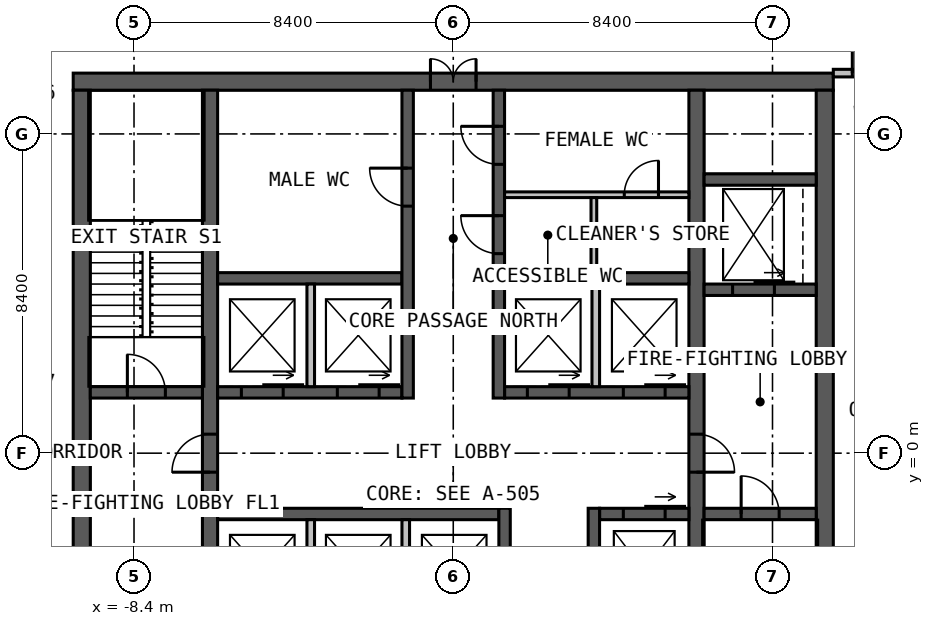
"""IFC4 building model, lengths in metres.
Left out: names, types, materials, properties, quantities, classifications, styles, units other than length and angle.
Written with IfcOpenShell. Run it as: python <this file> out.ifc"""

import sys

from ifc_helpers import new_model, si_unit, direction, frame, frame_2d, origin, place, context, subcontext, project, spatial, rectangle, extrude, element, fill, save


model = new_model("IFC4")
c1 = context("Model", 3, precision=1e-05, world=origin(), true_north=direction((0.0, 1.0)))
c2 = subcontext(c1, "Body", "Model", "MODEL_VIEW")
j1 = project(units=[si_unit("LENGTHUNIT", "METRE"), si_unit("PLANEANGLEUNIT", "RADIAN")], contexts=[c1])
p1 = place(None, origin())
s1 = spatial("IfcSite", under=j1, at=p1, CompositionType="ELEMENT")
p2 = place(p1, origin())
s2 = spatial("IfcBuilding", under=s1, at=p2, CompositionType="ELEMENT")
p3 = place(p2, frame((0.0, 0.0, 195.0)))
s3 = spatial("IfcBuildingStorey", under=s2, at=p3, CompositionType="ELEMENT", Elevation=195.0)
p4 = place(p3, frame((-10.0, 9.775, 0.0), z_axis=(0.0, 0.0, 1.0), x_axis=(1.0, 0.0, 0.0)))
e1 = element("IfcWall", 1, at=p4, inside=s3, PredefinedType="SOLIDWALL", context=c2, shape_type="SweptSolid", body=[
    extrude(rectangle(XDim=20.0, YDim=0.45, at=frame_2d((10.0, 0.0))), origin(), (0.0, 0.0, 1.0), 4.0),
])
p5 = place(p4, frame((9.4, 0.0, 0.0)))
e2 = element("IfcOpeningElement", 2, at=p5, cuts=e1, PredefinedType="OPENING", context=c2, shape_type="SweptSolid", body=[
    extrude(rectangle(XDim=1.2, YDim=2.2, at=frame_2d((0.6, 1.1))), frame((0.0, 0.235, 0.0), z_axis=(0.0, -1.0, 0.0), x_axis=(1.0, 0.0, 0.0)), (0.0, 0.0, 1.0), 0.47),
])
for number, where, z_axis, x_axis in (
    (3, (9.775, -9.55, 0.0), (0.0, 0.0, 1.0), (0.0, 1.0, 0.0)),
    (4, (-9.775, 9.55, 0.0), (0.0, 0.0, 1.0), (0.0, -1.0, 0.0)),
):
    element("IfcWall", number, at=place(p3, frame(where, z_axis=z_axis, x_axis=x_axis)), inside=s3, PredefinedType="SOLIDWALL", context=c2, shape_type="SweptSolid", body=[
        extrude(rectangle(XDim=19.1, YDim=0.45, at=frame_2d((9.55, 0.0))), origin(), (0.0, 0.0, 1.0), 4.0),
    ])
p6 = place(p3, frame((-6.4, -9.55, 0.0), z_axis=(0.0, 0.0, 1.0), x_axis=(0.0, 1.0, 0.0)))
e5 = element("IfcWall", 5, at=p6, inside=s3, PredefinedType="SOLIDWALL", context=c2, shape_type="SweptSolid", body=[
    extrude(rectangle(XDim=19.1, YDim=0.4, at=frame_2d((9.55, 0.0))), origin(), (0.0, 0.0, 1.0), 4.0),
])
p7 = place(p6, frame((9.05, 0.0, 0.0)))
e6 = element("IfcOpeningElement", 6, at=p7, cuts=e5, PredefinedType="OPENING", context=c2, shape_type="SweptSolid", body=[
    extrude(rectangle(XDim=1.0, YDim=2.2, at=frame_2d((0.5, 1.1))), frame((0.0, 0.21, 0.0), z_axis=(0.0, -1.0, 0.0), x_axis=(1.0, 0.0, 0.0)), (0.0, 0.0, 1.0), 0.42),
])
p8 = place(p3, frame((6.4, 9.55, 0.0), z_axis=(0.0, 0.0, 1.0), x_axis=(0.0, -1.0, 0.0)))
e7 = element("IfcWall", 7, at=p8, inside=s3, PredefinedType="SOLIDWALL", context=c2, shape_type="SweptSolid", body=[
    extrude(rectangle(XDim=19.1, YDim=0.4, at=frame_2d((9.55, 0.0))), origin(), (0.0, 0.0, 1.0), 4.0),
])
p9 = place(p8, frame((9.05, 0.0, 0.0)))
e8 = element("IfcOpeningElement", 8, at=p9, cuts=e7, PredefinedType="OPENING", context=c2, shape_type="SweptSolid", body=[
    extrude(rectangle(XDim=1.0, YDim=2.2, at=frame_2d((0.5, 1.1))), frame((0.0, 0.21, 0.0), z_axis=(0.0, -1.0, 0.0), x_axis=(1.0, 0.0, 0.0)), (0.0, 0.0, 1.0), 0.42),
])
p10 = place(p3, frame((-6.2, 1.6, 0.0), z_axis=(0.0, 0.0, 1.0), x_axis=(1.0, 0.0, 0.0)))
e9 = element("IfcWall", 9, at=p10, inside=s3, PredefinedType="SOLIDWALL", context=c2, shape_type="SweptSolid", body=[
    extrude(rectangle(XDim=4.85, YDim=0.3, at=frame_2d((2.425, 0.0))), origin(), (0.0, 0.0, 1.0), 4.0),
])
p11 = place(p10, frame((0.625, 0.0, 0.0)))
e10 = element("IfcOpeningElement", 10, at=p11, cuts=e9, PredefinedType="OPENING", context=c2, shape_type="SweptSolid", body=[
    extrude(rectangle(XDim=1.1, YDim=2.2, at=frame_2d((0.55, 1.1))), frame((0.0, 0.16, 0.0), z_axis=(0.0, -1.0, 0.0), x_axis=(1.0, 0.0, 0.0)), (0.0, 0.0, 1.0), 0.32),
])
p12 = place(p10, frame((3.15, 0.0, 0.0)))
e11 = element("IfcOpeningElement", 11, at=p12, cuts=e9, PredefinedType="OPENING", context=c2, shape_type="SweptSolid", body=[
    extrude(rectangle(XDim=1.1, YDim=2.2, at=frame_2d((0.55, 1.1))), frame((0.0, 0.16, 0.0), z_axis=(0.0, -1.0, 0.0), x_axis=(1.0, 0.0, 0.0)), (0.0, 0.0, 1.0), 0.32),
])
p13 = place(p3, frame((1.35, 1.6, 0.0), z_axis=(0.0, 0.0, 1.0), x_axis=(1.0, 0.0, 0.0)))
e12 = element("IfcWall", 12, at=p13, inside=s3, PredefinedType="SOLIDWALL", context=c2, shape_type="SweptSolid", body=[
    extrude(rectangle(XDim=4.85, YDim=0.3, at=frame_2d((2.425, 0.0))), origin(), (0.0, 0.0, 1.0), 4.0),
])
p14 = place(p13, frame((0.6, 0.0, 0.0)))
e13 = element("IfcOpeningElement", 13, at=p14, cuts=e12, PredefinedType="OPENING", context=c2, shape_type="SweptSolid", body=[
    extrude(rectangle(XDim=1.1, YDim=2.2, at=frame_2d((0.55, 1.1))), frame((0.0, 0.16, 0.0), z_axis=(0.0, -1.0, 0.0), x_axis=(1.0, 0.0, 0.0)), (0.0, 0.0, 1.0), 0.32),
])
p15 = place(p13, frame((3.125, 0.0, 0.0)))
e14 = element("IfcOpeningElement", 14, at=p15, cuts=e12, PredefinedType="OPENING", context=c2, shape_type="SweptSolid", body=[
    extrude(rectangle(XDim=1.1, YDim=2.2, at=frame_2d((0.55, 1.1))), frame((0.0, 0.16, 0.0), z_axis=(0.0, -1.0, 0.0), x_axis=(1.0, 0.0, 0.0)), (0.0, 0.0, 1.0), 0.32),
])
for number, where, z_axis, x_axis in (
    (15, (-6.2, 4.6, 0.0), (0.0, 0.0, 1.0), (1.0, 0.0, 0.0)),
    (16, (1.35, 4.6, 0.0), (0.0, 0.0, 1.0), (1.0, 0.0, 0.0)),
):
    element("IfcWall", number, at=place(p3, frame(where, z_axis=z_axis, x_axis=x_axis)), inside=s3, PredefinedType="SOLIDWALL", context=c2, shape_type="SweptSolid", body=[
        extrude(rectangle(XDim=4.85, YDim=0.3, at=frame_2d((2.425, 0.0))), origin(), (0.0, 0.0, 1.0), 4.0),
    ])
p16 = place(p3, frame((-1.2, 1.45, 0.0), z_axis=(0.0, 0.0, 1.0), x_axis=(0.0, 1.0, 0.0)))
e17 = element("IfcWall", 17, at=p16, inside=s3, PredefinedType="SOLIDWALL", context=c2, shape_type="SweptSolid", body=[
    extrude(rectangle(XDim=8.1, YDim=0.3, at=frame_2d((4.05, 0.0))), origin(), (0.0, 0.0, 1.0), 4.0),
])
p17 = place(p16, frame((5.05, 0.0, 0.0)))
e18 = element("IfcOpeningElement", 18, at=p17, cuts=e17, PredefinedType="OPENING", context=c2, shape_type="SweptSolid", body=[
    extrude(rectangle(XDim=1.0, YDim=2.2, at=frame_2d((0.5, 1.1))), frame((0.0, 0.16, 0.0), z_axis=(0.0, -1.0, 0.0), x_axis=(1.0, 0.0, 0.0)), (0.0, 0.0, 1.0), 0.32),
])
p18 = place(p3, frame((1.2, 1.45, 0.0), z_axis=(0.0, 0.0, 1.0), x_axis=(0.0, 1.0, 0.0)))
e19 = element("IfcWall", 19, at=p18, inside=s3, PredefinedType="SOLIDWALL", context=c2, shape_type="SweptSolid", body=[
    extrude(rectangle(XDim=8.1, YDim=0.3, at=frame_2d((4.05, 0.0))), origin(), (0.0, 0.0, 1.0), 4.0),
])
p19 = place(p18, frame((3.8, 0.0, 0.0)))
e20 = element("IfcOpeningElement", 20, at=p19, cuts=e19, PredefinedType="OPENING", context=c2, shape_type="SweptSolid", body=[
    extrude(rectangle(XDim=1.0, YDim=2.2, at=frame_2d((0.5, 1.1))), frame((0.0, 0.16, 0.0), z_axis=(0.0, -1.0, 0.0), x_axis=(1.0, 0.0, 0.0)), (0.0, 0.0, 1.0), 0.32),
])
p20 = place(p18, frame((6.15, 0.0, 0.0)))
e21 = element("IfcOpeningElement", 21, at=p20, cuts=e19, PredefinedType="OPENING", context=c2, shape_type="SweptSolid", body=[
    extrude(rectangle(XDim=1.0, YDim=2.2, at=frame_2d((0.5, 1.1))), frame((0.0, 0.16, 0.0), z_axis=(0.0, -1.0, 0.0), x_axis=(1.0, 0.0, 0.0)), (0.0, 0.0, 1.0), 0.32),
])
p21 = place(p3, frame((-6.2, -1.6, 0.0), z_axis=(0.0, 0.0, 1.0), x_axis=(1.0, 0.0, 0.0)))
e22 = element("IfcWall", 22, at=p21, inside=s3, PredefinedType="SOLIDWALL", context=c2, shape_type="SweptSolid", body=[
    extrude(rectangle(XDim=7.4, YDim=0.3, at=frame_2d((3.7, 0.0))), origin(), (0.0, 0.0, 1.0), 4.0),
])
p22 = place(p3, frame((3.85, -1.6, 0.0), z_axis=(0.0, 0.0, 1.0), x_axis=(1.0, 0.0, 0.0)))
e23 = element("IfcWall", 23, at=p22, inside=s3, PredefinedType="SOLIDWALL", context=c2, shape_type="SweptSolid", body=[
    extrude(rectangle(XDim=2.35, YDim=0.3, at=frame_2d((1.175, 0.0))), origin(), (0.0, 0.0, 1.0), 4.0),
])
p23 = place(p22, frame((0.625, 0.0, 0.0)))
e24 = element("IfcOpeningElement", 24, at=p23, cuts=e23, PredefinedType="OPENING", context=c2, shape_type="SweptSolid", body=[
    extrude(rectangle(XDim=1.1, YDim=2.2, at=frame_2d((0.55, 1.1))), frame((0.0, 0.16, 0.0), z_axis=(0.0, -1.0, 0.0), x_axis=(1.0, 0.0, 0.0)), (0.0, 0.0, 1.0), 0.32),
])
p24 = place(p3, frame((1.35, -1.45, 0.0), z_axis=(0.0, 0.0, 1.0), x_axis=(0.0, -1.0, 0.0)))
e25 = element("IfcWall", 25, at=p24, inside=s3, PredefinedType="SOLIDWALL", context=c2, shape_type="SweptSolid", body=[
    extrude(rectangle(XDim=8.1, YDim=0.3, at=frame_2d((4.05, 0.0))), origin(), (0.0, 0.0, 1.0), 4.0),
])
p25 = place(p24, frame((5.975, 0.0, 0.0)))
e26 = element("IfcOpeningElement", 26, at=p25, cuts=e25, PredefinedType="OPENING", context=c2, shape_type="SweptSolid", body=[
    extrude(rectangle(XDim=1.0, YDim=2.2, at=frame_2d((0.5, 1.1))), frame((0.0, 0.16, 0.0), z_axis=(0.0, -1.0, 0.0), x_axis=(1.0, 0.0, 0.0)), (0.0, 0.0, 1.0), 0.32),
])
p26 = place(p24, frame((3.525, 0.0, 0.0)))
e27 = element("IfcOpeningElement", 27, at=p26, cuts=e25, PredefinedType="OPENING", context=c2, shape_type="SweptSolid", body=[
    extrude(rectangle(XDim=0.9, YDim=2.2, at=frame_2d((0.45, 1.1))), frame((0.0, 0.16, 0.0), z_axis=(0.0, -1.0, 0.0), x_axis=(1.0, 0.0, 0.0)), (0.0, 0.0, 1.0), 0.32),
])
p27 = place(p3, frame((3.7, -1.45, 0.0), z_axis=(0.0, 0.0, 1.0), x_axis=(0.0, -1.0, 0.0)))
e28 = element("IfcWall", 28, at=p27, inside=s3, PredefinedType="SOLIDWALL", context=c2, shape_type="SweptSolid", body=[
    extrude(rectangle(XDim=8.1, YDim=0.3, at=frame_2d((4.05, 0.0))), origin(), (0.0, 0.0, 1.0), 4.0),
])
p28 = place(p27, frame((5.1, 0.0, 0.0)))
e29 = element("IfcOpeningElement", 29, at=p28, cuts=e28, PredefinedType="OPENING", context=c2, shape_type="SweptSolid", body=[
    extrude(rectangle(XDim=0.9, YDim=2.2, at=frame_2d((0.45, 1.1))), frame((0.0, 0.16, 0.0), z_axis=(0.0, -1.0, 0.0), x_axis=(1.0, 0.0, 0.0)), (0.0, 0.0, 1.0), 0.32),
])
p29 = place(p3, frame((-9.55, 1.6, 0.0), z_axis=(0.0, 0.0, 1.0), x_axis=(1.0, 0.0, 0.0)))
e30 = element("IfcWall", 30, at=p29, inside=s3, PredefinedType="SOLIDWALL", context=c2, shape_type="SweptSolid", body=[
    extrude(rectangle(XDim=2.95, YDim=0.3, at=frame_2d((1.475, 0.0))), origin(), (0.0, 0.0, 1.0), 4.0),
])
p30 = place(p29, frame((0.975, 0.0, 0.0)))
e31 = element("IfcOpeningElement", 31, at=p30, cuts=e30, PredefinedType="OPENING", context=c2, shape_type="SweptSolid", body=[
    extrude(rectangle(XDim=1.0, YDim=2.2, at=frame_2d((0.5, 1.1))), frame((0.0, 0.16, 0.0), z_axis=(0.0, -1.0, 0.0), x_axis=(1.0, 0.0, 0.0)), (0.0, 0.0, 1.0), 0.32),
])
p31 = place(p3, frame((6.6, -1.6, 0.0), z_axis=(0.0, 0.0, 1.0), x_axis=(1.0, 0.0, 0.0)))
e32 = element("IfcWall", 32, at=p31, inside=s3, PredefinedType="SOLIDWALL", context=c2, shape_type="SweptSolid", body=[
    extrude(rectangle(XDim=2.95, YDim=0.3, at=frame_2d((1.475, 0.0))), origin(), (0.0, 0.0, 1.0), 4.0),
])
p32 = place(p31, frame((0.975, 0.0, 0.0)))
e33 = element("IfcOpeningElement", 33, at=p32, cuts=e32, PredefinedType="OPENING", context=c2, shape_type="SweptSolid", body=[
    extrude(rectangle(XDim=1.0, YDim=2.2, at=frame_2d((0.5, 1.1))), frame((0.0, 0.16, 0.0), z_axis=(0.0, -1.0, 0.0), x_axis=(1.0, 0.0, 0.0)), (0.0, 0.0, 1.0), 0.32),
])
p33 = place(p3, frame((6.6, 4.3, 0.0), z_axis=(0.0, 0.0, 1.0), x_axis=(1.0, 0.0, 0.0)))
e34 = element("IfcWall", 34, at=p33, inside=s3, PredefinedType="SOLIDWALL", context=c2, shape_type="SweptSolid", body=[
    extrude(rectangle(XDim=2.95, YDim=0.3, at=frame_2d((1.475, 0.0))), origin(), (0.0, 0.0, 1.0), 4.0),
])
p34 = place(p33, frame((0.75, 0.0, 0.0)))
e35 = element("IfcOpeningElement", 35, at=p34, cuts=e34, PredefinedType="OPENING", context=c2, shape_type="SweptSolid", body=[
    extrude(rectangle(XDim=1.1, YDim=2.2, at=frame_2d((0.55, 1.1))), frame((0.0, 0.16, 0.0), z_axis=(0.0, -1.0, 0.0), x_axis=(1.0, 0.0, 0.0)), (0.0, 0.0, 1.0), 0.32),
])
p35 = place(p3, frame((6.6, 7.2, 0.0), z_axis=(0.0, 0.0, 1.0), x_axis=(1.0, 0.0, 0.0)))
e36 = element("IfcWall", 36, at=p35, inside=s3, PredefinedType="SOLIDWALL", context=c2, shape_type="SweptSolid", body=[
    extrude(rectangle(XDim=2.95, YDim=0.3, at=frame_2d((1.475, 0.0))), origin(), (0.0, 0.0, 1.0), 4.0),
])
for number, where, z_axis, x_axis in (
    (37, (-3.75, 1.75, 0.0), (0.0, 0.0, 1.0), (0.0, 1.0, 0.0)),
    (38, (3.75, 1.75, 0.0), (0.0, 0.0, 1.0), (0.0, 1.0, 0.0)),
    (39, (-3.75, -1.75, 0.0), (0.0, 0.0, 1.0), (0.0, -1.0, 0.0)),
    (40, (-1.25, -1.75, 0.0), (0.0, 0.0, 1.0), (0.0, -1.0, 0.0)),
):
    element("IfcWall", number, at=place(p3, frame(where, z_axis=z_axis, x_axis=x_axis)), inside=s3, PredefinedType="SOLIDWALL", context=c2, shape_type="SweptSolid", body=[
        extrude(rectangle(XDim=2.7, YDim=0.2, at=frame_2d((1.35, 0.0))), origin(), (0.0, 0.0, 1.0), 3.75),
    ])
p36 = place(p3, frame((1.35, 6.8, 0.0), z_axis=(0.0, 0.0, 1.0), x_axis=(1.0, 0.0, 0.0)))
e41 = element("IfcWall", 41, at=p36, inside=s3, PredefinedType="PARTITIONING", context=c2, shape_type="SweptSolid", body=[
    extrude(rectangle(XDim=4.85, YDim=0.15, at=frame_2d((2.425, 0.0))), origin(), (0.0, 0.0, 1.0), 3.75),
])
p37 = place(p36, frame((3.15, 0.0, 0.0)))
e42 = element("IfcOpeningElement", 42, at=p37, cuts=e41, PredefinedType="OPENING", context=c2, shape_type="SweptSolid", body=[
    extrude(rectangle(XDim=0.9, YDim=2.2, at=frame_2d((0.45, 1.1))), frame((0.0, 0.085, 0.0), z_axis=(0.0, -1.0, 0.0), x_axis=(1.0, 0.0, 0.0)), (0.0, 0.0, 1.0), 0.17),
])
p38 = place(p3, frame((3.7, 4.75, 0.0), z_axis=(0.0, 0.0, 1.0), x_axis=(0.0, 1.0, 0.0)))
e43 = element("IfcWall", 43, at=p38, inside=s3, PredefinedType="PARTITIONING", context=c2, shape_type="SweptSolid", body=[
    extrude(rectangle(XDim=1.975, YDim=0.15, at=frame_2d((0.988, 0.0))), origin(), (0.0, 0.0, 1.0), 3.75),
])
p39 = place(p3, frame((10.0, 10.0, 0.0), z_axis=(0.0, 0.0, 1.0), x_axis=(1.0, 0.0, 0.0)))
e44 = element("IfcWall", 44, at=p39, inside=s3, PredefinedType="PARTITIONING", context=c2, shape_type="SweptSolid", body=[
    extrude(rectangle(XDim=2.0, YDim=0.2, at=frame_2d((1.0, 0.0))), origin(), (0.0, 0.0, 1.0), 3.8),
])
p40 = place(p39, frame((0.5, 0.0, 0.0)))
e45 = element("IfcOpeningElement", 45, at=p40, cuts=e44, PredefinedType="OPENING", context=c2, shape_type="SweptSolid", body=[
    extrude(rectangle(XDim=1.0, YDim=2.2, at=frame_2d((0.5, 1.1))), frame((0.0, 0.11, 0.0), z_axis=(0.0, -1.0, 0.0), x_axis=(1.0, 0.0, 0.0)), (0.0, 0.0, 1.0), 0.22),
])
p41 = place(p5, origin())
e46 = element("IfcDoor", 46, at=p41, inside=s3, OperationType="DOUBLE_DOOR_SINGLE_SWING", PredefinedType="DOOR", context=c2, shape_type="SweptSolid", body=[
    extrude(rectangle(XDim=1.2, YDim=2.2, at=frame_2d((0.6, 1.1))), frame((0.0, 0.025, 0.0), z_axis=(0.0, -1.0, 0.0), x_axis=(1.0, 0.0, 0.0)), (0.0, 0.0, 1.0), 0.05),
])
fill(e2, e46)
p42 = place(p7, origin())
e47 = element("IfcDoor", 47, at=p42, inside=s3, OperationType="SINGLE_SWING_LEFT", PredefinedType="DOOR", context=c2, shape_type="SweptSolid", body=[
    extrude(rectangle(XDim=1.0, YDim=2.2, at=frame_2d((0.5, 1.1))), frame((0.0, 0.025, 0.0), z_axis=(0.0, -1.0, 0.0), x_axis=(1.0, 0.0, 0.0)), (0.0, 0.0, 1.0), 0.05),
])
fill(e6, e47)
p43 = place(p9, origin())
e48 = element("IfcDoor", 48, at=p43, inside=s3, OperationType="SINGLE_SWING_RIGHT", PredefinedType="DOOR", context=c2, shape_type="SweptSolid", body=[
    extrude(rectangle(XDim=1.0, YDim=2.2, at=frame_2d((0.5, 1.1))), frame((0.0, 0.025, 0.0), z_axis=(0.0, -1.0, 0.0), x_axis=(1.0, 0.0, 0.0)), (0.0, 0.0, 1.0), 0.05),
])
fill(e8, e48)
p44 = place(p30, origin())
e49 = element("IfcDoor", 49, at=p44, inside=s3, OperationType="SINGLE_SWING_LEFT", PredefinedType="DOOR", context=c2, shape_type="SweptSolid", body=[
    extrude(rectangle(XDim=1.0, YDim=2.2, at=frame_2d((0.5, 1.1))), frame((0.0, 0.025, 0.0), z_axis=(0.0, -1.0, 0.0), x_axis=(1.0, 0.0, 0.0)), (0.0, 0.0, 1.0), 0.05),
])
fill(e31, e49)
p45 = place(p32, origin())
e50 = element("IfcDoor", 50, at=p45, inside=s3, OperationType="SINGLE_SWING_LEFT", PredefinedType="DOOR", context=c2, shape_type="SweptSolid", body=[
    extrude(rectangle(XDim=1.0, YDim=2.2, at=frame_2d((0.5, 1.1))), frame((0.0, 0.025, 0.0), z_axis=(0.0, -1.0, 0.0), x_axis=(1.0, 0.0, 0.0)), (0.0, 0.0, 1.0), 0.05),
])
fill(e33, e50)
p46 = place(p17, origin())
e51 = element("IfcDoor", 51, at=p46, inside=s3, OperationType="SINGLE_SWING_RIGHT", PredefinedType="DOOR", context=c2, shape_type="SweptSolid", body=[
    extrude(rectangle(XDim=1.0, YDim=2.2, at=frame_2d((0.5, 1.1))), frame((0.0, 0.025, 0.0), z_axis=(0.0, -1.0, 0.0), x_axis=(1.0, 0.0, 0.0)), (0.0, 0.0, 1.0), 0.05),
])
fill(e18, e51)
p47 = place(p19, origin())
e52 = element("IfcDoor", 52, at=p47, inside=s3, OperationType="SINGLE_SWING_RIGHT", PredefinedType="DOOR", context=c2, shape_type="SweptSolid", body=[
    extrude(rectangle(XDim=1.0, YDim=2.2, at=frame_2d((0.5, 1.1))), frame((0.0, 0.025, 0.0), z_axis=(0.0, -1.0, 0.0), x_axis=(1.0, 0.0, 0.0)), (0.0, 0.0, 1.0), 0.05),
])
fill(e20, e52)
p48 = place(p20, origin())
e53 = element("IfcDoor", 53, at=p48, inside=s3, OperationType="SINGLE_SWING_RIGHT", PredefinedType="DOOR", context=c2, shape_type="SweptSolid", body=[
    extrude(rectangle(XDim=1.0, YDim=2.2, at=frame_2d((0.5, 1.1))), frame((0.0, 0.025, 0.0), z_axis=(0.0, -1.0, 0.0), x_axis=(1.0, 0.0, 0.0)), (0.0, 0.0, 1.0), 0.05),
])
fill(e21, e53)
p49 = place(p37, origin())
e54 = element("IfcDoor", 54, at=p49, inside=s3, OperationType="SINGLE_SWING_RIGHT", PredefinedType="DOOR", context=c2, shape_type="SweptSolid", body=[
    extrude(rectangle(XDim=0.9, YDim=2.2, at=frame_2d((0.45, 1.1))), frame((0.0, 0.025, 0.0), z_axis=(0.0, -1.0, 0.0), x_axis=(1.0, 0.0, 0.0)), (0.0, 0.0, 1.0), 0.05),
])
fill(e42, e54)
p50 = place(p11, origin())
e55 = element("IfcDoor", 55, at=p50, inside=s3, OperationType="SLIDING_TO_LEFT", PredefinedType="DOOR", context=c2, shape_type="SweptSolid", body=[
    extrude(rectangle(XDim=1.1, YDim=2.2, at=frame_2d((0.55, 1.1))), frame((0.0, 0.025, 0.0), z_axis=(0.0, -1.0, 0.0), x_axis=(1.0, 0.0, 0.0)), (0.0, 0.0, 1.0), 0.05),
])
fill(e10, e55)
p51 = place(p12, origin())
e56 = element("IfcDoor", 56, at=p51, inside=s3, OperationType="SLIDING_TO_LEFT", PredefinedType="DOOR", context=c2, shape_type="SweptSolid", body=[
    extrude(rectangle(XDim=1.1, YDim=2.2, at=frame_2d((0.55, 1.1))), frame((0.0, 0.025, 0.0), z_axis=(0.0, -1.0, 0.0), x_axis=(1.0, 0.0, 0.0)), (0.0, 0.0, 1.0), 0.05),
])
fill(e11, e56)
p52 = place(p14, origin())
e57 = element("IfcDoor", 57, at=p52, inside=s3, OperationType="SLIDING_TO_LEFT", PredefinedType="DOOR", context=c2, shape_type="SweptSolid", body=[
    extrude(rectangle(XDim=1.1, YDim=2.2, at=frame_2d((0.55, 1.1))), frame((0.0, 0.025, 0.0), z_axis=(0.0, -1.0, 0.0), x_axis=(1.0, 0.0, 0.0)), (0.0, 0.0, 1.0), 0.05),
])
fill(e13, e57)
p53 = place(p15, origin())
e58 = element("IfcDoor", 58, at=p53, inside=s3, OperationType="SLIDING_TO_LEFT", PredefinedType="DOOR", context=c2, shape_type="SweptSolid", body=[
    extrude(rectangle(XDim=1.1, YDim=2.2, at=frame_2d((0.55, 1.1))), frame((0.0, 0.025, 0.0), z_axis=(0.0, -1.0, 0.0), x_axis=(1.0, 0.0, 0.0)), (0.0, 0.0, 1.0), 0.05),
])
fill(e14, e58)
p54 = place(p23, origin())
e59 = element("IfcDoor", 59, at=p54, inside=s3, OperationType="SLIDING_TO_LEFT", PredefinedType="DOOR", context=c2, shape_type="SweptSolid", body=[
    extrude(rectangle(XDim=1.1, YDim=2.2, at=frame_2d((0.55, 1.1))), frame((0.0, 0.025, 0.0), z_axis=(0.0, -1.0, 0.0), x_axis=(1.0, 0.0, 0.0)), (0.0, 0.0, 1.0), 0.05),
])
fill(e24, e59)
p55 = place(p34, origin())
e60 = element("IfcDoor", 60, at=p55, inside=s3, OperationType="SLIDING_TO_LEFT", PredefinedType="DOOR", context=c2, shape_type="SweptSolid", body=[
    extrude(rectangle(XDim=1.1, YDim=2.2, at=frame_2d((0.55, 1.1))), frame((0.0, 0.025, 0.0), z_axis=(0.0, -1.0, 0.0), x_axis=(1.0, 0.0, 0.0)), (0.0, 0.0, 1.0), 0.05),
])
fill(e35, e60)
p56 = place(p40, origin())
e61 = element("IfcDoor", 61, at=p56, inside=s3, OperationType="SINGLE_SWING_LEFT", PredefinedType="DOOR", context=c2, shape_type="SweptSolid", body=[
    extrude(rectangle(XDim=1.0, YDim=2.2, at=frame_2d((0.5, 1.1))), frame((0.0, 0.025, 0.0), z_axis=(0.0, -1.0, 0.0), x_axis=(1.0, 0.0, 0.0)), (0.0, 0.0, 1.0), 0.05),
])
fill(e45, e61)
save(model, sys.argv[1])
